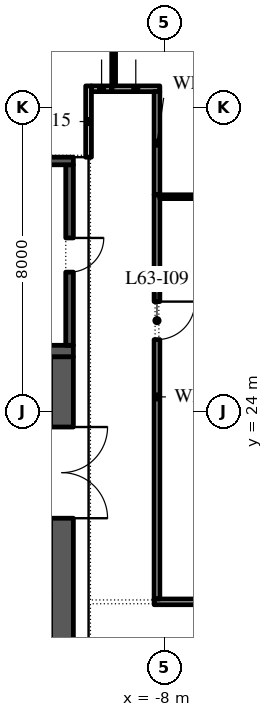
"""IFC4 building model, lengths in metres.
Left out: names, types, materials, properties, quantities, classifications, styles, units other than length and angle.
Written with IfcOpenShell. Run it as: python <this file> out.ifc"""

import sys

from ifc_helpers import new_model, si_unit, direction, frame, frame_2d, origin, place, context, subcontext, project, spatial, rectangle, extrude, element, fill, save


model = new_model("IFC4")
c1 = context("Model", 3, precision=1e-05, world=origin(), true_north=direction((0.0, 1.0)))
c2 = subcontext(c1, "Body", "Model", "MODEL_VIEW")
j1 = project(units=[si_unit("LENGTHUNIT", "METRE"), si_unit("PLANEANGLEUNIT", "RADIAN")], contexts=[c1])
p1 = place(None, origin())
s1 = spatial("IfcSite", under=j1, at=p1, CompositionType="ELEMENT")
p2 = place(p1, origin())
s2 = spatial("IfcBuilding", under=s1, at=p2, CompositionType="ELEMENT")
p3 = place(p2, frame((0.0, 0.0, 289.2)))
s3 = spatial("IfcBuildingStorey", under=s2, at=p3, CompositionType="ELEMENT", Elevation=289.2)
p4 = place(p3, frame((-10.7, -2.45, 0.0), z_axis=(0.0, 0.0, 1.0), x_axis=(0.0, 1.0, 0.0)))
e1 = element("IfcWall", 1, at=p4, inside=s3, PredefinedType="SHEAR", context=c2, shape_type="SweptSolid", body=[
    extrude(rectangle(XDim=27.9, YDim=0.6, at=frame_2d((13.95, 0.0))), origin(), (0.0, 0.0, 1.0), 3.95),
])
p5 = place(p4, frame((23.65, 0.0, 0.0)))
e2 = element("IfcOpeningElement", 2, at=p5, cuts=e1, PredefinedType="OPENING", context=c2, shape_type="SweptSolid", body=[
    extrude(rectangle(XDim=2.4, YDim=2.1, at=frame_2d((1.2, 1.05))), frame((0.0, 0.31, 0.0), z_axis=(0.0, -1.0, 0.0), x_axis=(1.0, 0.0, 0.0)), (0.0, 0.0, 1.0), 0.62),
])
p6 = place(p4, frame((0.788, 0.0, 0.0)))
e3 = element("IfcOpeningElement", 3, at=p6, cuts=e1, PredefinedType="OPENING", context=c2, shape_type="SweptSolid", body=[
    extrude(rectangle(XDim=0.9, YDim=2.1, at=frame_2d((0.45, 1.05))), frame((0.0, 0.31, 0.0), z_axis=(0.0, -1.0, 0.0), x_axis=(1.0, 0.0, 0.0)), (0.0, 0.0, 1.0), 0.62),
])
p7 = place(p4, frame((3.962, 0.0, 0.0)))
e4 = element("IfcOpeningElement", 4, at=p7, cuts=e1, PredefinedType="OPENING", context=c2, shape_type="SweptSolid", body=[
    extrude(rectangle(XDim=1.0, YDim=2.1, at=frame_2d((0.5, 1.05))), frame((0.0, 0.31, 0.0), z_axis=(0.0, -1.0, 0.0), x_axis=(1.0, 0.0, 0.0)), (0.0, 0.0, 1.0), 0.62),
])
p8 = place(p3, frame((-21.6, 25.6, 0.0), z_axis=(0.0, 0.0, 1.0), x_axis=(1.0, 0.0, 0.0)))
e5 = element("IfcWall", 5, at=p8, inside=s3, PredefinedType="SHEAR", context=c2, shape_type="SweptSolid", body=[
    extrude(rectangle(XDim=11.2, YDim=0.3, at=frame_2d((5.6, 0.0))), origin(), (0.0, 0.0, 1.0), 3.95),
])
p9 = place(p3, frame((-10.5, 25.75, 0.0), z_axis=(0.0, 0.0, 1.0), x_axis=(0.0, 1.0, 0.0)))
e6 = element("IfcWall", 6, at=p9, inside=s3, PredefinedType="SHEAR", context=c2, shape_type="SweptSolid", body=[
    extrude(rectangle(XDim=4.75, YDim=0.2, at=frame_2d((2.375, 0.0))), origin(), (0.0, 0.0, 1.0), 3.95),
])
p10 = place(p9, frame((1.925, 0.0, 0.0)))
e7 = element("IfcOpeningElement", 7, at=p10, cuts=e6, PredefinedType="OPENING", context=c2, shape_type="SweptSolid", body=[
    extrude(rectangle(XDim=0.9, YDim=2.1, at=frame_2d((0.45, 1.05))), frame((0.0, 0.11, 0.0), z_axis=(0.0, -1.0, 0.0), x_axis=(1.0, 0.0, 0.0)), (0.0, 0.0, 1.0), 0.22),
])
p11 = place(p3, frame((-21.6, 30.6, 0.0), z_axis=(0.0, 0.0, 1.0), x_axis=(1.0, 0.0, 0.0)))
e8 = element("IfcWall", 8, at=p11, inside=s3, PredefinedType="SHEAR", context=c2, shape_type="SweptSolid", body=[
    extrude(rectangle(XDim=11.2, YDim=0.2, at=frame_2d((5.6, 0.0))), origin(), (0.0, 0.0, 1.0), 3.95),
])
p12 = place(p3, frame((-10.0, 30.7, 0.0), z_axis=(0.0, 0.0, 1.0), x_axis=(0.0, 1.0, 0.0)))
e9 = element("IfcWall", 9, at=p12, inside=s3, PredefinedType="PARTITIONING", context=c2, shape_type="SweptSolid", body=[
    extrude(rectangle(XDim=1.875, YDim=0.15, at=frame_2d((0.938, 0.0))), origin(), (0.0, 0.0, 1.0), 3.95),
])
p13 = place(p3, frame((-9.925, 32.5, 0.0), z_axis=(0.0, 0.0, 1.0), x_axis=(1.0, 0.0, 0.0)))
e10 = element("IfcWall", 10, at=p13, inside=s3, PredefinedType="PARTITIONING", context=c2, shape_type="SweptSolid", body=[
    extrude(rectangle(XDim=0.535, YDim=0.15, at=frame_2d((0.268, 0.0))), origin(), (0.0, 0.0, 1.0), 3.95),
])
p14 = place(p3, frame((-9.39, 32.5, 0.0), z_axis=(0.0, 0.0, 1.0), x_axis=(1.0, 0.0, 0.0)))
e11 = element("IfcWall", 11, at=p14, inside=s3, PredefinedType="PARTITIONING", context=c2, shape_type="SweptSolid", body=[
    extrude(rectangle(XDim=1.265, YDim=0.15, at=frame_2d((0.632, 0.0))), origin(), (0.0, 0.0, 1.0), 3.95),
])
p15 = place(p3, frame((-9.34, 41.95, 0.0), z_axis=(0.0, 0.0, 1.0), x_axis=(0.0, -1.0, 0.0)))
e12 = element("IfcWall", 12, at=p15, inside=s3, PredefinedType="PARTITIONING", context=c2, shape_type="SweptSolid", body=[
    extrude(rectangle(XDim=9.375, YDim=0.1, at=frame_2d((4.688, 0.0))), origin(), (0.0, 0.0, 1.0), 3.95),
])
p16 = place(p3, frame((-8.275, 19.0, 0.0), z_axis=(0.0, 0.0, 1.0), x_axis=(1.0, 0.0, 0.0)))
e13 = element("IfcWall", 13, at=p16, inside=s3, PredefinedType="PARTITIONING", context=c2, shape_type="SweptSolid", body=[
    extrude(rectangle(XDim=7.36, YDim=0.15, at=frame_2d((3.68, 0.0))), origin(), (0.0, 0.0, 1.0), 3.95),
])
p17 = place(p3, frame((-8.2, 29.71, 0.0), z_axis=(0.0, 0.0, 1.0), x_axis=(0.0, -1.0, 0.0)))
e14 = element("IfcWall", 14, at=p17, inside=s3, PredefinedType="PARTITIONING", context=c2, shape_type="SweptSolid", body=[
    extrude(rectangle(XDim=10.635, YDim=0.15, at=frame_2d((5.317, 0.0))), origin(), (0.0, 0.0, 1.0), 3.95),
])
p18 = place(p17, frame((2.81, 0.0, 0.0)))
e15 = element("IfcOpeningElement", 15, at=p18, cuts=e14, PredefinedType="OPENING", context=c2, shape_type="SweptSolid", body=[
    extrude(rectangle(XDim=1.0, YDim=2.1, at=frame_2d((0.5, 1.05))), frame((0.0, 0.085, 0.0), z_axis=(0.0, -1.0, 0.0), x_axis=(1.0, 0.0, 0.0)), (0.0, 0.0, 1.0), 0.17),
])
p19 = place(p3, frame((-8.125, 29.66, 0.0), z_axis=(0.0, 0.0, 1.0), x_axis=(1.0, 0.0, 0.0)))
e16 = element("IfcWall", 16, at=p19, inside=s3, PredefinedType="PARTITIONING", context=c2, shape_type="SweptSolid", body=[
    extrude(rectangle(XDim=7.21, YDim=0.1, at=frame_2d((3.605, 0.0))), origin(), (0.0, 0.0, 1.0), 3.95),
])
p20 = place(p3, frame((-8.2, 32.425, 0.0), z_axis=(0.0, 0.0, 1.0), x_axis=(0.0, -1.0, 0.0)))
e17 = element("IfcWall", 17, at=p20, inside=s3, PredefinedType="PARTITIONING", context=c2, shape_type="SweptSolid", body=[
    extrude(rectangle(XDim=2.715, YDim=0.15, at=frame_2d((1.357, 0.0))), origin(), (0.0, 0.0, 1.0), 3.95),
])
p21 = place(p5, frame((2.4, 0.0, 0.0), z_axis=(0.0, 0.0, 1.0), x_axis=(-1.0, 0.0, 0.0)))
e18 = element("IfcDoor", 18, at=p21, inside=s3, OperationType="DOUBLE_DOOR_SINGLE_SWING", PredefinedType="DOOR", context=c2, shape_type="SweptSolid", body=[
    extrude(rectangle(XDim=2.4, YDim=2.1, at=frame_2d((1.2, 1.05))), frame((0.0, 0.025, 0.0), z_axis=(0.0, -1.0, 0.0), x_axis=(1.0, 0.0, 0.0)), (0.0, 0.0, 1.0), 0.05),
])
fill(e2, e18)
p22 = place(p10, frame((0.9, 0.15, 0.0), z_axis=(0.0, 0.0, 1.0), x_axis=(-1.0, 0.0, 0.0)))
e19 = element("IfcDoor", 19, at=p22, inside=s3, OperationType="SINGLE_SWING_RIGHT", PredefinedType="DOOR", context=c2, shape_type="SweptSolid", body=[
    extrude(rectangle(XDim=0.9, YDim=2.1, at=frame_2d((0.45, 1.05))), frame((0.0, 0.1, 0.0), z_axis=(0.0, -1.0, 0.0), x_axis=(1.0, 0.0, 0.0)), (0.0, 0.0, 1.0), 0.05),
])
fill(e7, e19)
p23 = place(p18, origin())
e20 = element("IfcDoor", 20, at=p23, inside=s3, OperationType="SINGLE_SWING_RIGHT", PredefinedType="DOOR", context=c2, shape_type="SweptSolid", body=[
    extrude(rectangle(XDim=1.0, YDim=2.1, at=frame_2d((0.5, 1.05))), frame((0.0, 0.025, 0.0), z_axis=(0.0, -1.0, 0.0), x_axis=(1.0, 0.0, 0.0)), (0.0, 0.0, 1.0), 0.05),
])
fill(e15, e20)
save(model, sys.argv[1])
